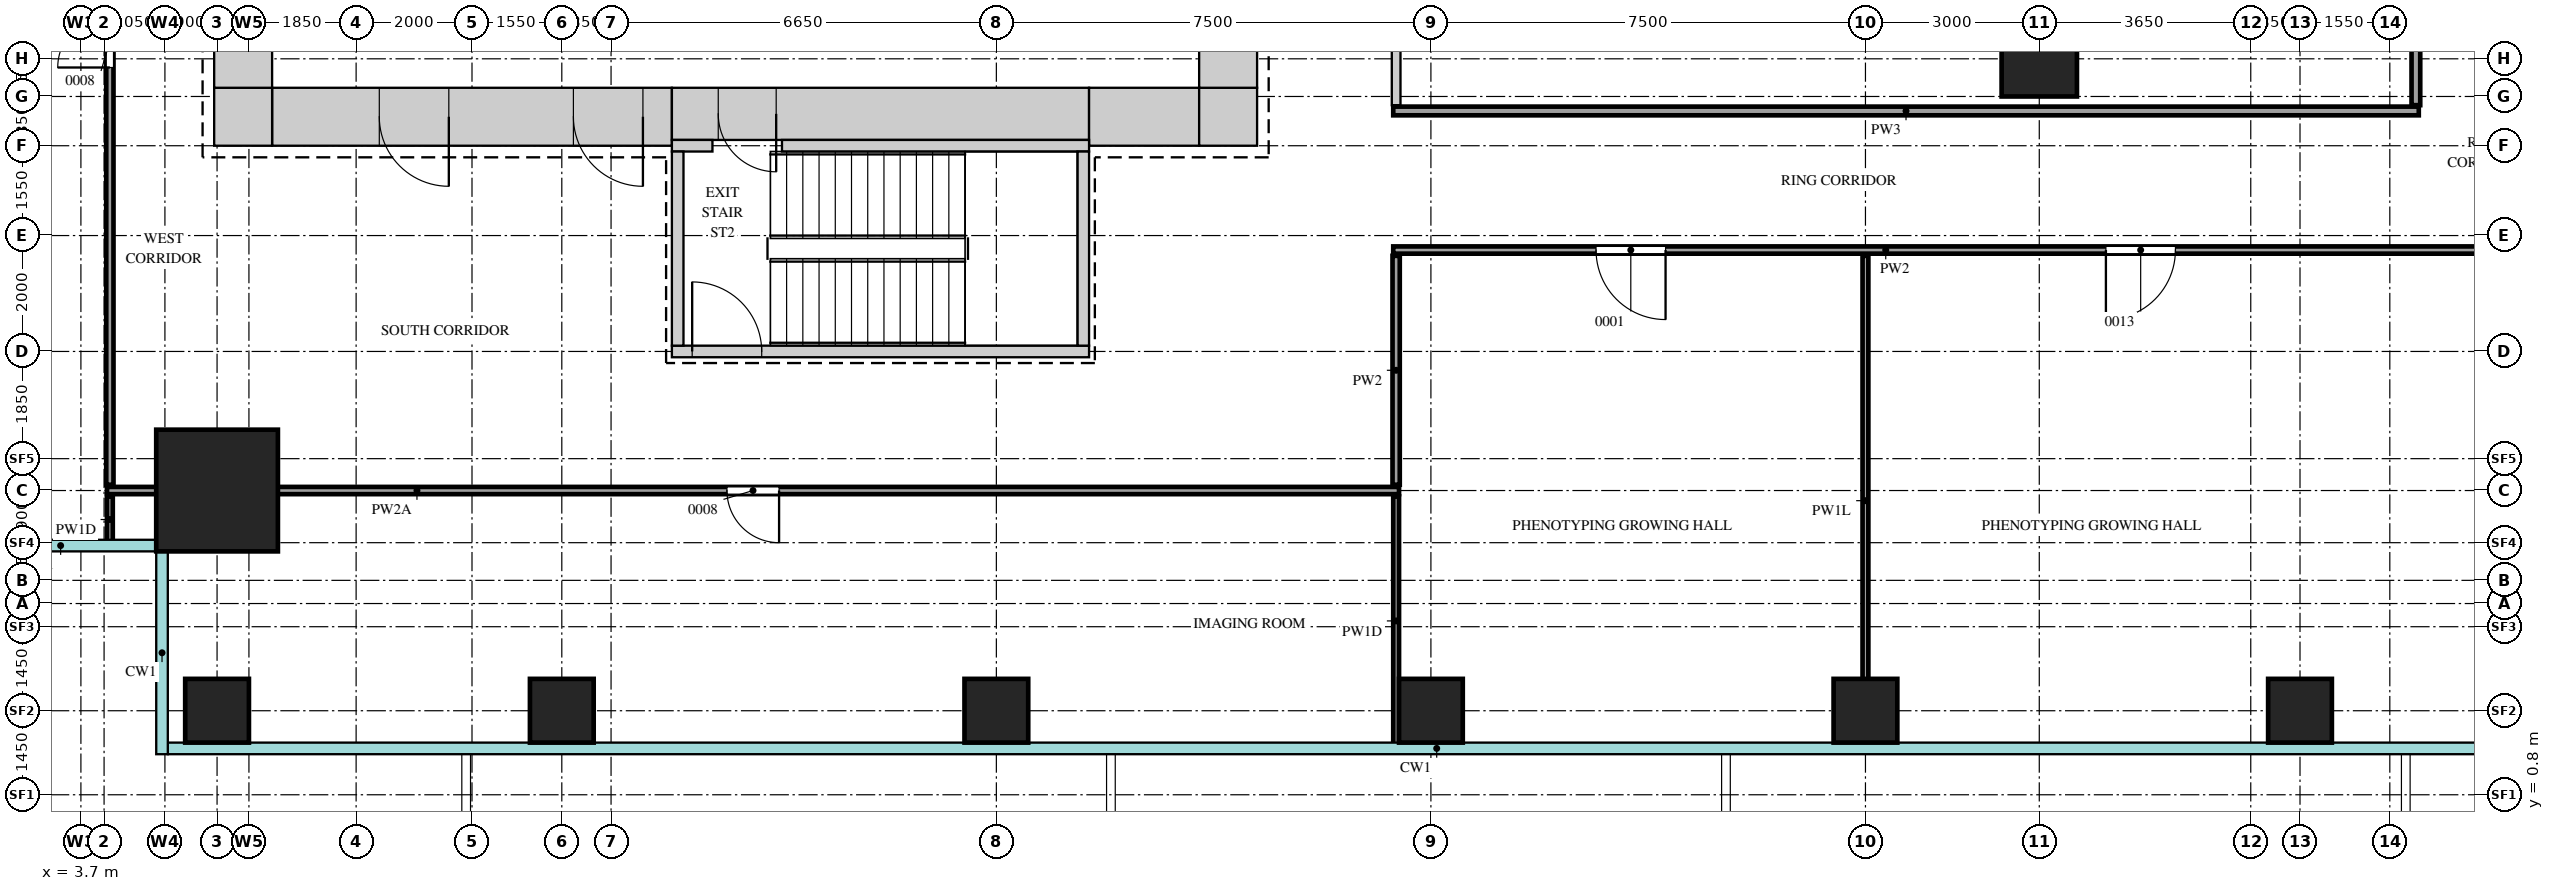
"""IFC4 building model, lengths in metres.
Left out: names, types, materials, properties, quantities, classifications, styles, units other than length and angle.
Written with IfcOpenShell. Run it as: python <this file> out.ifc"""

import sys

from ifc_helpers import new_model, si_unit, direction, frame, frame_2d, origin, origin_2d, place, context, subcontext, project, spatial, rectangle, extrude, source, transform, mapped, element, fill, save


model = new_model("IFC4")
c1 = context("Model", 3, precision=1e-05, world=origin(), true_north=direction((0.0, 1.0)))
c2 = subcontext(c1, "Body", "Model", "MODEL_VIEW")
j1 = project(units=[si_unit("LENGTHUNIT", "METRE"), si_unit("PLANEANGLEUNIT", "RADIAN")], contexts=[c1])
p1 = place(None, origin())
s1 = spatial("IfcSite", under=j1, at=p1, CompositionType="ELEMENT")
p2 = place(p1, origin())
s2 = spatial("IfcBuilding", under=s1, at=p2, CompositionType="ELEMENT")
p3 = place(p2, frame((0.0, 0.0, 132.3)))
s3 = spatial("IfcBuildingStorey", under=s2, at=p3, CompositionType="ELEMENT", Elevation=132.3)
m1 = source(origin(), c2, "Body", "SweptSolid", [
    extrude(rectangle(XDim=6.9, YDim=1.0, at=frame_2d((3.45, 0.0))), origin(), (0.0, 0.0, 1.0), 4.1),
])
p4 = place(p3, frame((7.0, 12.5, 0.0), z_axis=(0.0, 0.0, 1.0), x_axis=(1.0, 0.0, 0.0)))
e1 = element("IfcWall", 1, at=p4, inside=s3, PredefinedType="SHEAR", context=c2, shape_type="MappedRepresentation", body=[
    mapped(m1, transform((0.0, 0.0, 0.0))),
])
m2 = source(origin(), c2, "Body", "SweptSolid", [
    extrude(rectangle(XDim=1.2, YDim=2.1, at=frame_2d((0.6, 1.05))), frame((0.0, 0.51, 0.0), z_axis=(0.0, -1.0, 0.0), x_axis=(1.0, 0.0, 0.0)), (0.0, 0.0, 1.0), 1.02),
])
p5 = place(p4, frame((5.2, 0.0, 0.0)))
e2 = element("IfcOpeningElement", 2, at=p5, cuts=e1, PredefinedType="OPENING", context=c2, shape_type="MappedRepresentation", body=[
    mapped(m2, transform((0.0, 0.0, 0.0))),
])
p6 = place(p4, frame((1.85, 0.0, 0.0)))
e3 = element("IfcOpeningElement", 3, at=p6, cuts=e1, PredefinedType="OPENING", context=c2, shape_type="MappedRepresentation", body=[
    mapped(m2, transform((0.0, 0.0, 0.0))),
])
m3 = source(origin(), c2, "Body", "SweptSolid", [
    extrude(rectangle(XDim=7.2, YDim=0.9, at=frame_2d((3.6, 0.0))), origin(), (0.0, 0.0, 1.0), 4.1),
])
p7 = place(p3, frame((13.9, 12.55, 0.0), z_axis=(0.0, 0.0, 1.0), x_axis=(1.0, 0.0, 0.0)))
e4 = element("IfcWall", 4, at=p7, inside=s3, PredefinedType="SHEAR", context=c2, shape_type="MappedRepresentation", body=[
    mapped(m3, transform((0.0, 0.0, 0.0))),
])
m4 = source(origin(), c2, "Body", "SweptSolid", [
    extrude(rectangle(XDim=1.0, YDim=2.1, at=frame_2d((0.5, 1.05))), frame((0.0, 0.46, 0.0), z_axis=(0.0, -1.0, 0.0), x_axis=(1.0, 0.0, 0.0)), (0.0, 0.0, 1.0), 0.92),
])
p8 = place(p7, frame((0.8, 0.0, 0.0)))
e5 = element("IfcOpeningElement", 5, at=p8, cuts=e4, PredefinedType="OPENING", context=c2, shape_type="MappedRepresentation", body=[
    mapped(m4, transform((0.0, 0.0, 0.0))),
])
m5 = source(origin(), c2, "Body", "SweptSolid", [
    extrude(rectangle(XDim=1.9, YDim=1.0, at=frame_2d((0.95, 0.0))), origin(), (0.0, 0.0, 1.0), 4.1),
])
p9 = place(p3, frame((21.1, 12.5, 0.0), z_axis=(0.0, 0.0, 1.0), x_axis=(1.0, 0.0, 0.0)))
e6 = element("IfcWall", 6, at=p9, inside=s3, PredefinedType="SHEAR", context=c2, shape_type="MappedRepresentation", body=[
    mapped(m5, transform((0.0, 0.0, 0.0))),
])
m6 = source(origin(), c2, "Body", "SweptSolid", [
    extrude(rectangle(XDim=1.0, YDim=1.0, at=frame_2d((0.5, 0.0))), origin(), (0.0, 0.0, 1.0), 4.1),
])
for number, where, z_axis, x_axis in (
    (7, (23.0, 12.5, 0.0), (0.0, 0.0, 1.0), (1.0, 0.0, 0.0)),
    (8, (6.0, 12.5, 0.0), (0.0, 0.0, 1.0), (1.0, 0.0, 0.0)),
):
    element("IfcWall", number, at=place(p3, frame(where, z_axis=z_axis, x_axis=x_axis)), inside=s3, PredefinedType="SHEAR", context=c2, shape_type="MappedRepresentation", body=[
        mapped(m6, transform((0.0, 0.0, 0.0))),
    ])
m7 = source(origin(), c2, "Body", "SweptSolid", [
    extrude(rectangle(XDim=28.0, YDim=1.0, at=frame_2d((14.0, 0.0))), origin(), (0.0, 0.0, 1.0), 4.1),
])
p10 = place(p3, frame((23.5, 13.0, 0.0), z_axis=(0.0, 0.0, 1.0), x_axis=(0.0, 1.0, 0.0)))
e9 = element("IfcWall", 9, at=p10, inside=s3, PredefinedType="SHEAR", context=c2, shape_type="MappedRepresentation", body=[
    mapped(m7, transform((0.0, 0.0, 0.0))),
])
m8 = source(origin(), c2, "Body", "SweptSolid", [
    extrude(rectangle(XDim=1.8, YDim=2.1, at=frame_2d((0.9, 1.05))), frame((0.0, 0.51, 0.0), z_axis=(0.0, -1.0, 0.0), x_axis=(1.0, 0.0, 0.0)), (0.0, 0.0, 1.0), 1.02),
])
p11 = place(p10, frame((22.6, 0.0, 0.0)))
e10 = element("IfcOpeningElement", 10, at=p11, cuts=e9, PredefinedType="OPENING", context=c2, shape_type="MappedRepresentation", body=[
    mapped(m8, transform((0.0, 0.0, 0.0))),
])
p12 = place(p10, frame((15.35, 0.0, 0.0)))
e11 = element("IfcOpeningElement", 11, at=p12, cuts=e9, PredefinedType="OPENING", context=c2, shape_type="MappedRepresentation", body=[
    mapped(m2, transform((0.0, 0.0, 0.0))),
])
m9 = source(origin(), c2, "Body", "SweptSolid", [
    extrude(rectangle(XDim=0.9, YDim=2.1, at=frame_2d((0.45, 1.05))), frame((0.0, 0.51, 0.0), z_axis=(0.0, -1.0, 0.0), x_axis=(1.0, 0.0, 0.0)), (0.0, 0.0, 1.0), 1.02),
])
p13 = place(p10, frame((1.35, 0.0, 0.0)))
e12 = element("IfcOpeningElement", 12, at=p13, cuts=e9, PredefinedType="OPENING", context=c2, shape_type="MappedRepresentation", body=[
    mapped(m9, transform((0.0, 0.0, 0.0))),
])
p14 = place(p10, frame((4.55, 0.0, 0.0)))
e13 = element("IfcOpeningElement", 13, at=p14, cuts=e9, PredefinedType="OPENING", context=c2, shape_type="MappedRepresentation", body=[
    mapped(m9, transform((0.0, 0.0, 0.0))),
])
p15 = place(p10, frame((7.8, 0.0, 0.0)))
e14 = element("IfcOpeningElement", 14, at=p15, cuts=e9, PredefinedType="OPENING", context=c2, shape_type="MappedRepresentation", body=[
    mapped(m9, transform((0.0, 0.0, 0.0))),
])
p16 = place(p3, frame((6.5, 13.0, 0.0), z_axis=(0.0, 0.0, 1.0), x_axis=(0.0, 1.0, 0.0)))
e15 = element("IfcWall", 15, at=p16, inside=s3, PredefinedType="SHEAR", context=c2, shape_type="MappedRepresentation", body=[
    mapped(m7, transform((0.0, 0.0, 0.0))),
])
m10 = source(origin(), c2, "Body", "SweptSolid", [
    extrude(rectangle(XDim=0.7, YDim=0.2, at=frame_2d((0.35, 0.0))), origin(), (0.0, 0.0, 1.0), 4.1),
])
p17 = place(p3, frame((13.9, 12.0, 0.0), z_axis=(0.0, 0.0, 1.0), x_axis=(1.0, 0.0, 0.0)))
e16 = element("IfcWall", 16, at=p17, inside=s3, PredefinedType="SHEAR", context=c2, shape_type="MappedRepresentation", body=[
    mapped(m10, transform((0.0, 0.0, 0.0))),
])
m11 = source(origin(), c2, "Body", "SweptSolid", [
    extrude(rectangle(XDim=5.3, YDim=0.2, at=frame_2d((2.65, 0.0))), origin(), (0.0, 0.0, 1.0), 4.1),
])
p18 = place(p3, frame((15.8, 12.0, 0.0), z_axis=(0.0, 0.0, 1.0), x_axis=(1.0, 0.0, 0.0)))
e17 = element("IfcWall", 17, at=p18, inside=s3, PredefinedType="SHEAR", context=c2, shape_type="MappedRepresentation", body=[
    mapped(m11, transform((0.0, 0.0, 0.0))),
])
m12 = source(origin(), c2, "Body", "SweptSolid", [
    extrude(rectangle(XDim=7.2, YDim=0.2, at=frame_2d((3.6, 0.0))), origin(), (0.0, 0.0, 1.0), 4.1),
])
p19 = place(p3, frame((13.9, 8.45, 0.0), z_axis=(0.0, 0.0, 1.0), x_axis=(1.0, 0.0, 0.0)))
e18 = element("IfcWall", 18, at=p19, inside=s3, PredefinedType="SHEAR", context=c2, shape_type="MappedRepresentation", body=[
    mapped(m12, transform((0.0, 0.0, 0.0))),
])
m13 = source(origin(), c2, "Body", "SweptSolid", [
    extrude(rectangle(XDim=1.2, YDim=2.1, at=frame_2d((0.6, 1.05))), frame((0.0, 0.11, 0.0), z_axis=(0.0, -1.0, 0.0), x_axis=(1.0, 0.0, 0.0)), (0.0, 0.0, 1.0), 0.22),
])
p20 = place(p19, frame((0.35, 0.0, 0.0)))
e19 = element("IfcOpeningElement", 19, at=p20, cuts=e18, PredefinedType="OPENING", context=c2, shape_type="MappedRepresentation", body=[
    mapped(m13, transform((0.0, 0.0, 0.0))),
])
m14 = source(origin(), c2, "Body", "SweptSolid", [
    extrude(rectangle(XDim=3.35, YDim=0.2, at=frame_2d((1.675, 0.0))), origin(), (0.0, 0.0, 1.0), 4.1),
])
for number, where, z_axis, x_axis in (
    (20, (21.0, 8.55, 0.0), (0.0, 0.0, 1.0), (0.0, 1.0, 0.0)),
    (21, (14.0, 8.55, 0.0), (0.0, 0.0, 1.0), (0.0, 1.0, 0.0)),
):
    element("IfcWall", number, at=place(p3, frame(where, z_axis=z_axis, x_axis=x_axis)), inside=s3, PredefinedType="SHEAR", context=c2, shape_type="MappedRepresentation", body=[
        mapped(m14, transform((0.0, 0.0, 0.0))),
    ])
m15 = source(origin(), c2, "Body", "SweptSolid", [
    extrude(rectangle(XDim=2.1, YDim=2.1, at=origin_2d()), origin(), (0.0, 0.0, 1.0), 4.4),
])
p21 = place(p3, frame((6.05, 6.05, 0.0), z_axis=(0.0, 0.0, 1.0), x_axis=(1.0, 0.0, 0.0)))
e22 = element("IfcColumn", 22, at=p21, inside=s3, PredefinedType="COLUMN", context=c2, shape_type="MappedRepresentation", body=[
    mapped(m15, transform((0.0, 0.0, 0.0))),
])
m16 = source(origin(), c2, "Body", "SweptSolid", [
    extrude(rectangle(XDim=1.1, YDim=1.1, at=origin_2d()), origin(), (0.0, 0.0, 1.0), 4.1),
])
for number, where, z_axis, x_axis in (
    (23, (6.05, 2.25, 0.0), (0.0, 0.0, 1.0), (1.0, 0.0, 0.0)),
    (24, (12.0, 2.25, 0.0), (0.0, 0.0, 1.0), (1.0, 0.0, 0.0)),
    (25, (19.5, 2.25, 0.0), (0.0, 0.0, 1.0), (1.0, 0.0, 0.0)),
    (26, (27.0, 2.25, 0.0), (0.0, 0.0, 1.0), (1.0, 0.0, 0.0)),
    (27, (34.5, 2.25, 0.0), (0.0, 0.0, 1.0), (1.0, 0.0, 0.0)),
    (28, (42.0, 2.25, 0.0), (0.0, 0.0, 1.0), (1.0, 0.0, 0.0)),
):
    element("IfcColumn", number, at=place(p3, frame(where, z_axis=z_axis, x_axis=x_axis)), inside=s3, PredefinedType="COLUMN", context=c2, shape_type="MappedRepresentation", body=[
        mapped(m16, transform((0.0, 0.0, 0.0))),
    ])
m17 = source(origin(), c2, "Body", "SweptSolid", [
    extrude(rectangle(XDim=1.3, YDim=1.3, at=origin_2d()), origin(), (0.0, 0.0, 1.0), 4.1),
])
p22 = place(p3, frame((37.5, 13.5, 0.0), z_axis=(0.0, 0.0, 1.0), x_axis=(1.0, 0.0, 0.0)))
e29 = element("IfcColumn", 29, at=p22, inside=s3, PredefinedType="COLUMN", context=c2, shape_type="MappedRepresentation", body=[
    mapped(m17, transform((0.0, 0.0, 0.0))),
])
m18 = source(origin(), c2, "Body", "SweptSolid", [
    extrude(rectangle(XDim=4.3, YDim=0.1, at=frame_2d((2.15, 0.0))), origin(), (0.0, 0.0, 1.0), 4.2),
])
p23 = place(p3, frame((26.4, 1.65, 0.0), z_axis=(0.0, 0.0, 1.0), x_axis=(0.0, 1.0, 0.0)))
e30 = element("IfcWall", 30, at=p23, inside=s3, PredefinedType="PARTITIONING", context=c2, shape_type="MappedRepresentation", body=[
    mapped(m18, transform((0.0, 0.0, 0.0))),
])
m19 = source(origin(), c2, "Body", "SweptSolid", [
    extrude(rectangle(XDim=8.45, YDim=0.1, at=frame_2d((4.225, 0.0))), origin(), (0.0, 0.0, 1.0), 3.6),
])
p24 = place(p3, frame((34.5, 1.65, 0.0), z_axis=(0.0, 0.0, 1.0), x_axis=(0.0, 1.0, 0.0)))
e31 = element("IfcWall", 31, at=p24, inside=s3, PredefinedType="PARTITIONING", context=c2, shape_type="MappedRepresentation", body=[
    mapped(m19, transform((0.0, 0.0, 0.0))),
])
m20 = source(origin(), c2, "Body", "SweptSolid", [
    extrude(rectangle(XDim=0.8, YDim=0.1, at=frame_2d((0.4, 0.0))), origin(), (0.0, 0.0, 1.0), 4.2),
])
p25 = place(p3, frame((4.2, 5.15, 0.0), z_axis=(0.0, 0.0, 1.0), x_axis=(0.0, 1.0, 0.0)))
e32 = element("IfcWall", 32, at=p25, inside=s3, PredefinedType="PARTITIONING", context=c2, shape_type="MappedRepresentation", body=[
    mapped(m20, transform((0.0, 0.0, 0.0))),
])
m21 = source(origin(), c2, "Body", "SweptSolid", [
    extrude(rectangle(XDim=22.3, YDim=0.125, at=frame_2d((11.15, 0.0))), origin(), (0.0, 0.0, 1.0), 3.55),
])
p26 = place(p3, frame((4.15, 6.05, 0.0), z_axis=(0.0, 0.0, 1.0), x_axis=(1.0, 0.0, 0.0)))
e33 = element("IfcWall", 33, at=p26, inside=s3, PredefinedType="PARTITIONING", context=c2, shape_type="MappedRepresentation", body=[
    mapped(m21, transform((0.0, 0.0, 0.0))),
])
m22 = source(origin(), c2, "Body", "SweptSolid", [
    extrude(rectangle(XDim=0.9, YDim=2.1, at=frame_2d((0.45, 1.05))), frame((0.0, 0.073, 0.0), z_axis=(0.0, -1.0, 0.0), x_axis=(1.0, 0.0, 0.0)), (0.0, 0.0, 1.0), 0.145),
])
p27 = place(p26, frame((10.7, 0.0, 0.0)))
e34 = element("IfcOpeningElement", 34, at=p27, cuts=e33, PredefinedType="OPENING", context=c2, shape_type="MappedRepresentation", body=[
    mapped(m22, transform((0.0, 0.0, 0.0))),
])
m23 = source(origin(), c2, "Body", "SweptSolid", [
    extrude(rectangle(XDim=21.15, YDim=0.125, at=frame_2d((10.575, 0.0))), origin(), (0.0, 0.0, 1.0), 4.2),
])
p28 = place(p3, frame((4.2, 6.15, 0.0), z_axis=(0.0, 0.0, 1.0), x_axis=(0.0, 1.0, 0.0)))
e35 = element("IfcWall", 35, at=p28, inside=s3, PredefinedType="PARTITIONING", context=c2, shape_type="MappedRepresentation", body=[
    mapped(m23, transform((0.0, 0.0, 0.0))),
])
p29 = place(p28, frame((7.2, 0.0, 0.0)))
e36 = element("IfcOpeningElement", 36, at=p29, cuts=e35, PredefinedType="OPENING", context=c2, shape_type="MappedRepresentation", body=[
    mapped(m22, transform((0.0, 0.0, 0.0))),
])
p30 = place(p28, frame((16.8, 0.0, 0.0)))
e37 = element("IfcOpeningElement", 37, at=p30, cuts=e35, PredefinedType="OPENING", context=c2, shape_type="MappedRepresentation", body=[
    mapped(m22, transform((0.0, 0.0, 0.0))),
])
m24 = source(origin(), c2, "Body", "SweptSolid", [
    extrude(rectangle(XDim=3.95, YDim=0.125, at=frame_2d((1.975, 0.0))), origin(), (0.0, 0.0, 1.0), 4.2),
])
p31 = place(p3, frame((26.4, 6.15, 0.0), z_axis=(0.0, 0.0, 1.0), x_axis=(0.0, 1.0, 0.0)))
e38 = element("IfcWall", 38, at=p31, inside=s3, PredefinedType="PARTITIONING", context=c2, shape_type="MappedRepresentation", body=[
    mapped(m24, transform((0.0, 0.0, 0.0))),
])
m25 = source(origin(), c2, "Body", "SweptSolid", [
    extrude(rectangle(XDim=20.0, YDim=0.125, at=frame_2d((10.0, 0.0))), origin(), (0.0, 0.0, 1.0), 4.2),
])
p32 = place(p3, frame((26.35, 10.2, 0.0), z_axis=(0.0, 0.0, 1.0), x_axis=(1.0, 0.0, 0.0)))
e39 = element("IfcWall", 39, at=p32, inside=s3, PredefinedType="PARTITIONING", context=c2, shape_type="MappedRepresentation", body=[
    mapped(m25, transform((0.0, 0.0, 0.0))),
])
m26 = source(origin(), c2, "Body", "SweptSolid", [
    extrude(rectangle(XDim=1.2, YDim=2.1, at=frame_2d((0.6, 1.05))), frame((0.0, 0.073, 0.0), z_axis=(0.0, -1.0, 0.0), x_axis=(1.0, 0.0, 0.0)), (0.0, 0.0, 1.0), 0.145),
])
p33 = place(p32, frame((3.5, 0.0, 0.0)))
e40 = element("IfcOpeningElement", 40, at=p33, cuts=e39, PredefinedType="OPENING", context=c2, shape_type="MappedRepresentation", body=[
    mapped(m26, transform((0.0, 0.0, 0.0))),
])
p34 = place(p32, frame((12.3, 0.0, 0.0)))
e41 = element("IfcOpeningElement", 41, at=p34, cuts=e39, PredefinedType="OPENING", context=c2, shape_type="MappedRepresentation", body=[
    mapped(m26, transform((0.0, 0.0, 0.0))),
])
m27 = source(origin(), c2, "Body", "SweptSolid", [
    extrude(rectangle(XDim=17.7, YDim=0.15, at=frame_2d((8.85, 0.0))), origin(), (0.0, 0.0, 1.0), 4.2),
])
p35 = place(p3, frame((26.35, 12.6, 0.0), z_axis=(0.0, 0.0, 1.0), x_axis=(1.0, 0.0, 0.0)))
e42 = element("IfcWall", 42, at=p35, inside=s3, PredefinedType="PARTITIONING", context=c2, shape_type="MappedRepresentation", body=[
    mapped(m27, transform((0.0, 0.0, 0.0))),
])
m28 = source(origin(), c2, "Body", "SweptSolid", [
    extrude(rectangle(XDim=5.2, YDim=0.15, at=frame_2d((2.6, 0.0))), origin(), (0.0, 0.0, 1.0), 4.2),
])
p36 = place(p3, frame((26.4, 12.7, 0.0), z_axis=(0.0, 0.0, 1.0), x_axis=(0.0, 1.0, 0.0)))
e43 = element("IfcWall", 43, at=p36, inside=s3, PredefinedType="PARTITIONING", context=c2, shape_type="MappedRepresentation", body=[
    mapped(m28, transform((0.0, 0.0, 0.0))),
])
m29 = source(origin(), c2, "Body", "SweptSolid", [
    extrude(rectangle(XDim=0.9, YDim=2.1, at=frame_2d((0.45, 1.05))), frame((0.0, 0.085, 0.0), z_axis=(0.0, -1.0, 0.0), x_axis=(1.0, 0.0, 0.0)), (0.0, 0.0, 1.0), 0.17),
])
p37 = place(p36, frame((2.15, 0.0, 0.0)))
e44 = element("IfcOpeningElement", 44, at=p37, cuts=e43, PredefinedType="OPENING", context=c2, shape_type="MappedRepresentation", body=[
    mapped(m29, transform((0.0, 0.0, 0.0))),
])
p38 = place(p3, frame((44.0, 12.7, 0.0), z_axis=(0.0, 0.0, 1.0), x_axis=(0.0, 1.0, 0.0)))
e45 = element("IfcWall", 45, at=p38, inside=s3, PredefinedType="PARTITIONING", context=c2, shape_type="MappedRepresentation", body=[
    mapped(m28, transform((0.0, 0.0, 0.0))),
])
m30 = source(origin(), c2, "Body", "SweptSolid", [
    extrude(rectangle(XDim=1.2, YDim=2.1, at=frame_2d((0.6, 1.05))), frame((0.0, 0.45, 0.0), z_axis=(0.0, -1.0, 0.0), x_axis=(1.0, 0.0, 0.0)), (0.0, 0.0, 1.0), 0.9),
])
p39 = place(p5, origin())
e46 = element("IfcDoor", 46, at=p39, inside=s3, OperationType="SINGLE_SWING_RIGHT", PredefinedType="DOOR", context=c2, shape_type="MappedRepresentation", body=[
    mapped(m30, transform((0.0, 0.0, 0.0))),
])
fill(e2, e46)
p40 = place(p6, origin())
e47 = element("IfcDoor", 47, at=p40, inside=s3, OperationType="SINGLE_SWING_RIGHT", PredefinedType="DOOR", context=c2, shape_type="MappedRepresentation", body=[
    mapped(m30, transform((0.0, 0.0, 0.0))),
])
fill(e3, e47)
m31 = source(origin(), c2, "Body", "SweptSolid", [
    extrude(rectangle(XDim=1.0, YDim=2.1, at=frame_2d((0.5, 1.05))), frame((0.0, 0.4, 0.0), z_axis=(0.0, -1.0, 0.0), x_axis=(1.0, 0.0, 0.0)), (0.0, 0.0, 1.0), 0.8),
])
p41 = place(p8, origin())
e48 = element("IfcDoor", 48, at=p41, inside=s3, OperationType="SINGLE_SWING_RIGHT", PredefinedType="DOOR", context=c2, shape_type="MappedRepresentation", body=[
    mapped(m31, transform((0.0, 0.0, 0.0))),
])
fill(e5, e48)
m32 = source(origin(), c2, "Body", "SweptSolid", [
    extrude(rectangle(XDim=1.2, YDim=2.1, at=frame_2d((0.6, 1.05))), frame((0.0, 0.025, 0.0), z_axis=(0.0, -1.0, 0.0), x_axis=(1.0, 0.0, 0.0)), (0.0, 0.0, 1.0), 0.05),
])
p42 = place(p33, origin())
e49 = element("IfcDoor", 49, at=p42, inside=s3, OperationType="SINGLE_SWING_RIGHT", PredefinedType="DOOR", context=c2, shape_type="MappedRepresentation", body=[
    mapped(m32, transform((0.0, 0.0, 0.0))),
])
fill(e40, e49)
p43 = place(p34, origin())
e50 = element("IfcDoor", 50, at=p43, inside=s3, OperationType="SINGLE_SWING_LEFT", PredefinedType="DOOR", context=c2, shape_type="MappedRepresentation", body=[
    mapped(m32, transform((0.0, 0.0, 0.0))),
])
fill(e41, e50)
m33 = source(origin(), c2, "Body", "SweptSolid", [
    extrude(rectangle(XDim=0.9, YDim=2.1, at=frame_2d((0.45, 1.05))), frame((0.0, 0.025, 0.0), z_axis=(0.0, -1.0, 0.0), x_axis=(1.0, 0.0, 0.0)), (0.0, 0.0, 1.0), 0.05),
])
p44 = place(p27, origin())
e51 = element("IfcDoor", 51, at=p44, inside=s3, OperationType="SINGLE_SWING_RIGHT", PredefinedType="DOOR", context=c2, shape_type="MappedRepresentation", body=[
    mapped(m33, transform((0.0, 0.0, 0.0))),
])
fill(e34, e51)
p45 = place(p29, origin())
e52 = element("IfcDoor", 52, at=p45, inside=s3, OperationType="SINGLE_SWING_RIGHT", PredefinedType="DOOR", context=c2, shape_type="MappedRepresentation", body=[
    mapped(m33, transform((0.0, 0.0, 0.0))),
])
fill(e36, e52)
p46 = place(p20, origin())
e53 = element("IfcDoor", 53, at=p46, inside=s3, OperationType="SINGLE_SWING_RIGHT", PredefinedType="DOOR", context=c2, shape_type="MappedRepresentation", body=[
    mapped(m32, transform((0.0, 0.0, 0.0))),
])
fill(e19, e53)
save(model, sys.argv[1])
